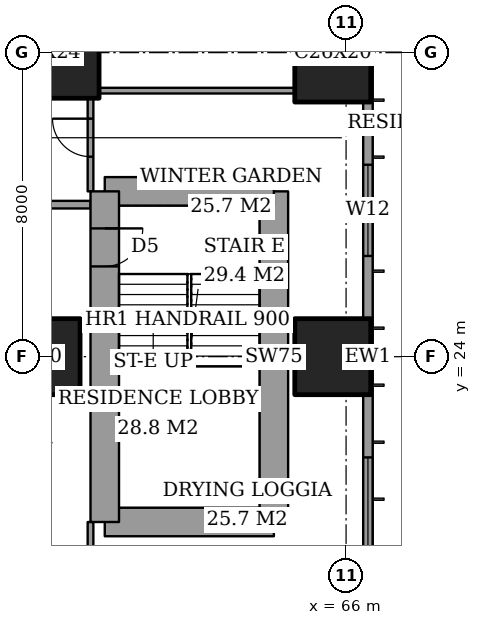
"""IFC4 building model, lengths in metres.
Left out: names, types, materials, properties, quantities, classifications, styles, units other than length and angle.
Written with IfcOpenShell. Run it as: python <this file> out.ifc"""

import sys

from ifc_helpers import new_model, si_unit, direction, frame, frame_2d, origin, origin_2d, place, context, subcontext, project, spatial, rectangle, extrude, element, fill, save


model = new_model("IFC4")
c1 = context("Model", 3, precision=1e-05, world=origin(), true_north=direction((0.0, 1.0)))
c2 = subcontext(c1, "Body", "Model", "MODEL_VIEW")
j1 = project(units=[si_unit("LENGTHUNIT", "METRE"), si_unit("PLANEANGLEUNIT", "RADIAN")], contexts=[c1])
p1 = place(None, origin())
s1 = spatial("IfcSite", under=j1, at=p1, CompositionType="ELEMENT")
p2 = place(p1, origin())
s2 = spatial("IfcBuilding", under=s1, at=p2, CompositionType="ELEMENT")
p3 = place(p2, frame((0.0, 0.0, 157.4)))
s3 = spatial("IfcBuildingStorey", under=s2, at=p3, CompositionType="ELEMENT", Elevation=157.4)
p4 = place(p3, frame((58.0, 24.0, 0.0), z_axis=(0.0, 0.0, 1.0), x_axis=(1.0, 0.0, 0.0)))
e1 = element("IfcColumn", 1, at=p4, inside=s3, PredefinedType="COLUMN", context=c2, shape_type="SweptSolid", body=[
    extrude(rectangle(XDim=2.0, YDim=2.0, at=origin_2d()), origin(), (0.0, 0.0, 1.0), 3.6),
])
p5 = place(p3, frame((58.0, 32.0, 0.0), z_axis=(0.0, 0.0, 1.0), x_axis=(1.0, 0.0, 0.0)))
e2 = element("IfcColumn", 2, at=p5, inside=s3, PredefinedType="COLUMN", context=c2, shape_type="SweptSolid", body=[
    extrude(rectangle(XDim=3.0, YDim=2.4, at=origin_2d()), origin(), (0.0, 0.0, 1.0), 3.6),
])
p6 = place(p3, frame((65.65, 24.0, 0.0), z_axis=(0.0, 0.0, 1.0), x_axis=(1.0, 0.0, 0.0)))
e3 = element("IfcColumn", 3, at=p6, inside=s3, PredefinedType="COLUMN", context=c2, shape_type="SweptSolid", body=[
    extrude(rectangle(XDim=2.0, YDim=2.0, at=origin_2d()), origin(), (0.0, 0.0, 1.0), 3.6),
])
p7 = place(p3, frame((65.65, 32.0, 0.0), z_axis=(0.0, 0.0, 1.0), x_axis=(0.0, 1.0, 0.0)))
e4 = element("IfcColumn", 4, at=p7, inside=s3, PredefinedType="COLUMN", context=c2, shape_type="SweptSolid", body=[
    extrude(rectangle(XDim=2.6, YDim=2.0, at=origin_2d()), origin(), (0.0, 0.0, 1.0), 3.6),
])
p8 = place(p3, frame((59.65, 19.65, 0.0), z_axis=(0.0, 0.0, 1.0), x_axis=(1.0, 0.0, 0.0)))
e5 = element("IfcWall", 5, at=p8, inside=s3, PredefinedType="SHEAR", context=c2, shape_type="SweptSolid", body=[
    extrude(rectangle(XDim=4.45, YDim=0.75, at=frame_2d((2.225, 0.0))), origin(), (0.0, 0.0, 1.0), 3.6),
])
p9 = place(p3, frame((64.1, 19.65, 0.0), z_axis=(0.0, 0.0, 1.0), x_axis=(0.0, 1.0, 0.0)))
e6 = element("IfcWall", 6, at=p9, inside=s3, PredefinedType="SHEAR", context=c2, shape_type="SweptSolid", body=[
    extrude(rectangle(XDim=8.7, YDim=0.75, at=frame_2d((4.35, 0.0))), origin(), (0.0, 0.0, 1.0), 3.6),
])
p10 = place(p3, frame((64.1, 28.35, 0.0), z_axis=(0.0, 0.0, 1.0), x_axis=(-1.0, 0.0, 0.0)))
e7 = element("IfcWall", 7, at=p10, inside=s3, PredefinedType="SHEAR", context=c2, shape_type="SweptSolid", body=[
    extrude(rectangle(XDim=4.45, YDim=0.75, at=frame_2d((2.225, 0.0))), origin(), (0.0, 0.0, 1.0), 3.6),
])
p11 = place(p3, frame((59.65, 28.35, 0.0), z_axis=(0.0, 0.0, 1.0), x_axis=(0.0, -1.0, 0.0)))
e8 = element("IfcWall", 8, at=p11, inside=s3, PredefinedType="SHEAR", context=c2, shape_type="SweptSolid", body=[
    extrude(rectangle(XDim=8.7, YDim=0.75, at=frame_2d((4.35, 0.0))), origin(), (0.0, 0.0, 1.0), 3.6),
])
p12 = place(p11, frame((0.975, 0.0, 0.0)))
e9 = element("IfcOpeningElement", 9, at=p12, cuts=e8, PredefinedType="OPENING", context=c2, shape_type="SweptSolid", body=[
    extrude(rectangle(XDim=1.0, YDim=2.1, at=frame_2d((0.5, 1.05))), frame((0.0, 0.385, 0.0), z_axis=(0.0, -1.0, 0.0), x_axis=(1.0, 0.0, 0.0)), (0.0, 0.0, 1.0), 0.77),
])
p13 = place(p3, frame((66.575, 3.175, 0.0), z_axis=(0.0, 0.0, 1.0), x_axis=(0.0, 1.0, 0.0)))
e10 = element("IfcWall", 10, at=p13, inside=s3, PredefinedType="SOLIDWALL", context=c2, shape_type="SweptSolid", body=[
    extrude(rectangle(XDim=41.65, YDim=0.25, at=frame_2d((20.825, 0.0))), origin(), (0.0, 0.0, 1.0), 3.6),
])
p14 = place(p13, frame((0.775, 0.0, 0.4)))
e11 = element("IfcOpeningElement", 11, at=p14, cuts=e10, PredefinedType="OPENING", context=c2, shape_type="SweptSolid", body=[
    extrude(rectangle(XDim=2.4, YDim=2.2, at=frame_2d((1.2, 1.1))), frame((0.0, 0.135, 0.0), z_axis=(0.0, -1.0, 0.0), x_axis=(1.0, 0.0, 0.0)), (0.0, 0.0, 1.0), 0.27),
])
p15 = place(p13, frame((6.225, 0.0, 0.4)))
e12 = element("IfcOpeningElement", 12, at=p15, cuts=e10, PredefinedType="OPENING", context=c2, shape_type="SweptSolid", body=[
    extrude(rectangle(XDim=1.2, YDim=2.2, at=frame_2d((0.6, 1.1))), frame((0.0, 0.135, 0.0), z_axis=(0.0, -1.0, 0.0), x_axis=(1.0, 0.0, 0.0)), (0.0, 0.0, 1.0), 0.27),
])
p16 = place(p13, frame((8.475, 0.0, 0.4)))
e13 = element("IfcOpeningElement", 13, at=p16, cuts=e10, PredefinedType="OPENING", context=c2, shape_type="SweptSolid", body=[
    extrude(rectangle(XDim=2.4, YDim=2.2, at=frame_2d((1.2, 1.1))), frame((0.0, 0.135, 0.0), z_axis=(0.0, -1.0, 0.0), x_axis=(1.0, 0.0, 0.0)), (0.0, 0.0, 1.0), 0.27),
])
p17 = place(p13, frame((15.775, 0.0, 0.4)))
e14 = element("IfcOpeningElement", 14, at=p17, cuts=e10, PredefinedType="OPENING", context=c2, shape_type="SweptSolid", body=[
    extrude(rectangle(XDim=2.4, YDim=2.2, at=frame_2d((1.2, 1.1))), frame((0.0, 0.135, 0.0), z_axis=(0.0, -1.0, 0.0), x_axis=(1.0, 0.0, 0.0)), (0.0, 0.0, 1.0), 0.27),
])
p18 = place(p13, frame((23.475, 0.0, 0.4)))
e15 = element("IfcOpeningElement", 15, at=p18, cuts=e10, PredefinedType="OPENING", context=c2, shape_type="SweptSolid", body=[
    extrude(rectangle(XDim=2.4, YDim=2.2, at=frame_2d((1.2, 1.1))), frame((0.0, 0.135, 0.0), z_axis=(0.0, -1.0, 0.0), x_axis=(1.0, 0.0, 0.0)), (0.0, 0.0, 1.0), 0.27),
])
p19 = place(p13, frame((30.975, 0.0, 0.4)))
e16 = element("IfcOpeningElement", 16, at=p19, cuts=e10, PredefinedType="OPENING", context=c2, shape_type="SweptSolid", body=[
    extrude(rectangle(XDim=2.4, YDim=2.2, at=frame_2d((1.2, 1.1))), frame((0.0, 0.135, 0.0), z_axis=(0.0, -1.0, 0.0), x_axis=(1.0, 0.0, 0.0)), (0.0, 0.0, 1.0), 0.27),
])
p20 = place(p13, frame((34.5, 0.0, 0.4)))
e17 = element("IfcOpeningElement", 17, at=p20, cuts=e10, PredefinedType="OPENING", context=c2, shape_type="SweptSolid", body=[
    extrude(rectangle(XDim=1.2, YDim=2.2, at=frame_2d((0.6, 1.1))), frame((0.0, 0.135, 0.0), z_axis=(0.0, -1.0, 0.0), x_axis=(1.0, 0.0, 0.0)), (0.0, 0.0, 1.0), 0.27),
])
p21 = place(p13, frame((38.475, 0.0, 0.4)))
e18 = element("IfcOpeningElement", 18, at=p21, cuts=e10, PredefinedType="OPENING", context=c2, shape_type="SweptSolid", body=[
    extrude(rectangle(XDim=2.4, YDim=2.2, at=frame_2d((1.2, 1.1))), frame((0.0, 0.135, 0.0), z_axis=(0.0, -1.0, 0.0), x_axis=(1.0, 0.0, 0.0)), (0.0, 0.0, 1.0), 0.27),
])
p22 = place(p3, frame((42.0, 28.0, 0.0), z_axis=(0.0, 0.0, 1.0), x_axis=(1.0, 0.0, 0.0)))
e19 = element("IfcWall", 19, at=p22, inside=s3, PredefinedType="PARTITIONING", context=c2, shape_type="SweptSolid", body=[
    extrude(rectangle(XDim=17.275, YDim=0.2, at=frame_2d((8.637, 0.0))), origin(), (0.0, 0.0, 1.0), 3.35),
])
p23 = place(p22, frame((9.4, 0.0, 0.0)))
e20 = element("IfcOpeningElement", 20, at=p23, cuts=e19, PredefinedType="OPENING", context=c2, shape_type="SweptSolid", body=[
    extrude(rectangle(XDim=1.2, YDim=2.4, at=frame_2d((0.6, 1.2))), frame((0.0, 0.11, 0.0), z_axis=(0.0, -1.0, 0.0), x_axis=(1.0, 0.0, 0.0)), (0.0, 0.0, 1.0), 0.22),
])
p24 = place(p3, frame((59.5, 31.0, 0.0), z_axis=(0.0, 0.0, 1.0), x_axis=(1.0, 0.0, 0.0)))
e21 = element("IfcWall", 21, at=p24, inside=s3, PredefinedType="PARTITIONING", context=c2, shape_type="SweptSolid", body=[
    extrude(rectangle(XDim=5.15, YDim=0.15, at=frame_2d((2.575, 0.0))), origin(), (0.0, 0.0, 1.0), 3.35),
])
p25 = place(p3, frame((59.275, 17.2, 0.0), z_axis=(0.0, 0.0, 1.0), x_axis=(0.0, 1.0, 0.0)))
e22 = element("IfcWall", 22, at=p25, inside=s3, PredefinedType="PARTITIONING", context=c2, shape_type="SweptSolid", body=[
    extrude(rectangle(XDim=2.45, YDim=0.15, at=frame_2d((1.225, 0.0))), origin(), (0.0, 0.0, 1.0), 3.35),
])
p26 = place(p25, frame((0.587, 0.0, 0.0)))
e23 = element("IfcOpeningElement", 23, at=p26, cuts=e22, PredefinedType="OPENING", context=c2, shape_type="SweptSolid", body=[
    extrude(rectangle(XDim=0.9, YDim=2.1, at=frame_2d((0.45, 1.05))), frame((0.0, 0.085, 0.0), z_axis=(0.0, -1.0, 0.0), x_axis=(1.0, 0.0, 0.0)), (0.0, 0.0, 1.0), 0.17),
])
p27 = place(p3, frame((59.275, 28.35, 0.0), z_axis=(0.0, 0.0, 1.0), x_axis=(0.0, 1.0, 0.0)))
e24 = element("IfcWall", 24, at=p27, inside=s3, PredefinedType="PARTITIONING", context=c2, shape_type="SweptSolid", body=[
    extrude(rectangle(XDim=2.45, YDim=0.15, at=frame_2d((1.225, 0.0))), origin(), (0.0, 0.0, 1.0), 3.35),
])
p28 = place(p27, frame((0.913, 0.0, 0.0)))
e25 = element("IfcOpeningElement", 25, at=p28, cuts=e24, PredefinedType="OPENING", context=c2, shape_type="SweptSolid", body=[
    extrude(rectangle(XDim=1.0, YDim=2.1, at=frame_2d((0.5, 1.05))), frame((0.0, 0.085, 0.0), z_axis=(0.0, -1.0, 0.0), x_axis=(1.0, 0.0, 0.0)), (0.0, 0.0, 1.0), 0.17),
])
p29 = place(p17, origin())
e26 = element("IfcWindow", 26, at=p29, inside=s3, PartitioningType="SINGLE_PANEL", PredefinedType="WINDOW", context=c2, shape_type="SweptSolid", body=[
    extrude(rectangle(XDim=2.4, YDim=2.2, at=frame_2d((1.2, 1.1))), frame((0.0, 0.03, 0.0), z_axis=(0.0, -1.0, 0.0), x_axis=(1.0, 0.0, 0.0)), (0.0, 0.0, 1.0), 0.06),
])
fill(e14, e26)
p30 = place(p18, origin())
e27 = element("IfcWindow", 27, at=p30, inside=s3, PartitioningType="SINGLE_PANEL", PredefinedType="WINDOW", context=c2, shape_type="SweptSolid", body=[
    extrude(rectangle(XDim=2.4, YDim=2.2, at=frame_2d((1.2, 1.1))), frame((0.0, 0.03, 0.0), z_axis=(0.0, -1.0, 0.0), x_axis=(1.0, 0.0, 0.0)), (0.0, 0.0, 1.0), 0.06),
])
fill(e15, e27)
p31 = place(p28, origin())
e28 = element("IfcDoor", 28, at=p31, inside=s3, OperationType="SINGLE_SWING_LEFT", PredefinedType="DOOR", context=c2, shape_type="SweptSolid", body=[
    extrude(rectangle(XDim=1.0, YDim=2.1, at=frame_2d((0.5, 1.05))), frame((0.0, 0.025, 0.0), z_axis=(0.0, -1.0, 0.0), x_axis=(1.0, 0.0, 0.0)), (0.0, 0.0, 1.0), 0.05),
])
fill(e25, e28)
p32 = place(p12, origin())
e29 = element("IfcDoor", 29, at=p32, inside=s3, OperationType="SINGLE_SWING_RIGHT", PredefinedType="DOOR", context=c2, shape_type="SweptSolid", body=[
    extrude(rectangle(XDim=1.0, YDim=2.1, at=frame_2d((0.5, 1.05))), frame((0.0, 0.025, 0.0), z_axis=(0.0, -1.0, 0.0), x_axis=(1.0, 0.0, 0.0)), (0.0, 0.0, 1.0), 0.05),
])
fill(e9, e29)
save(model, sys.argv[1])
